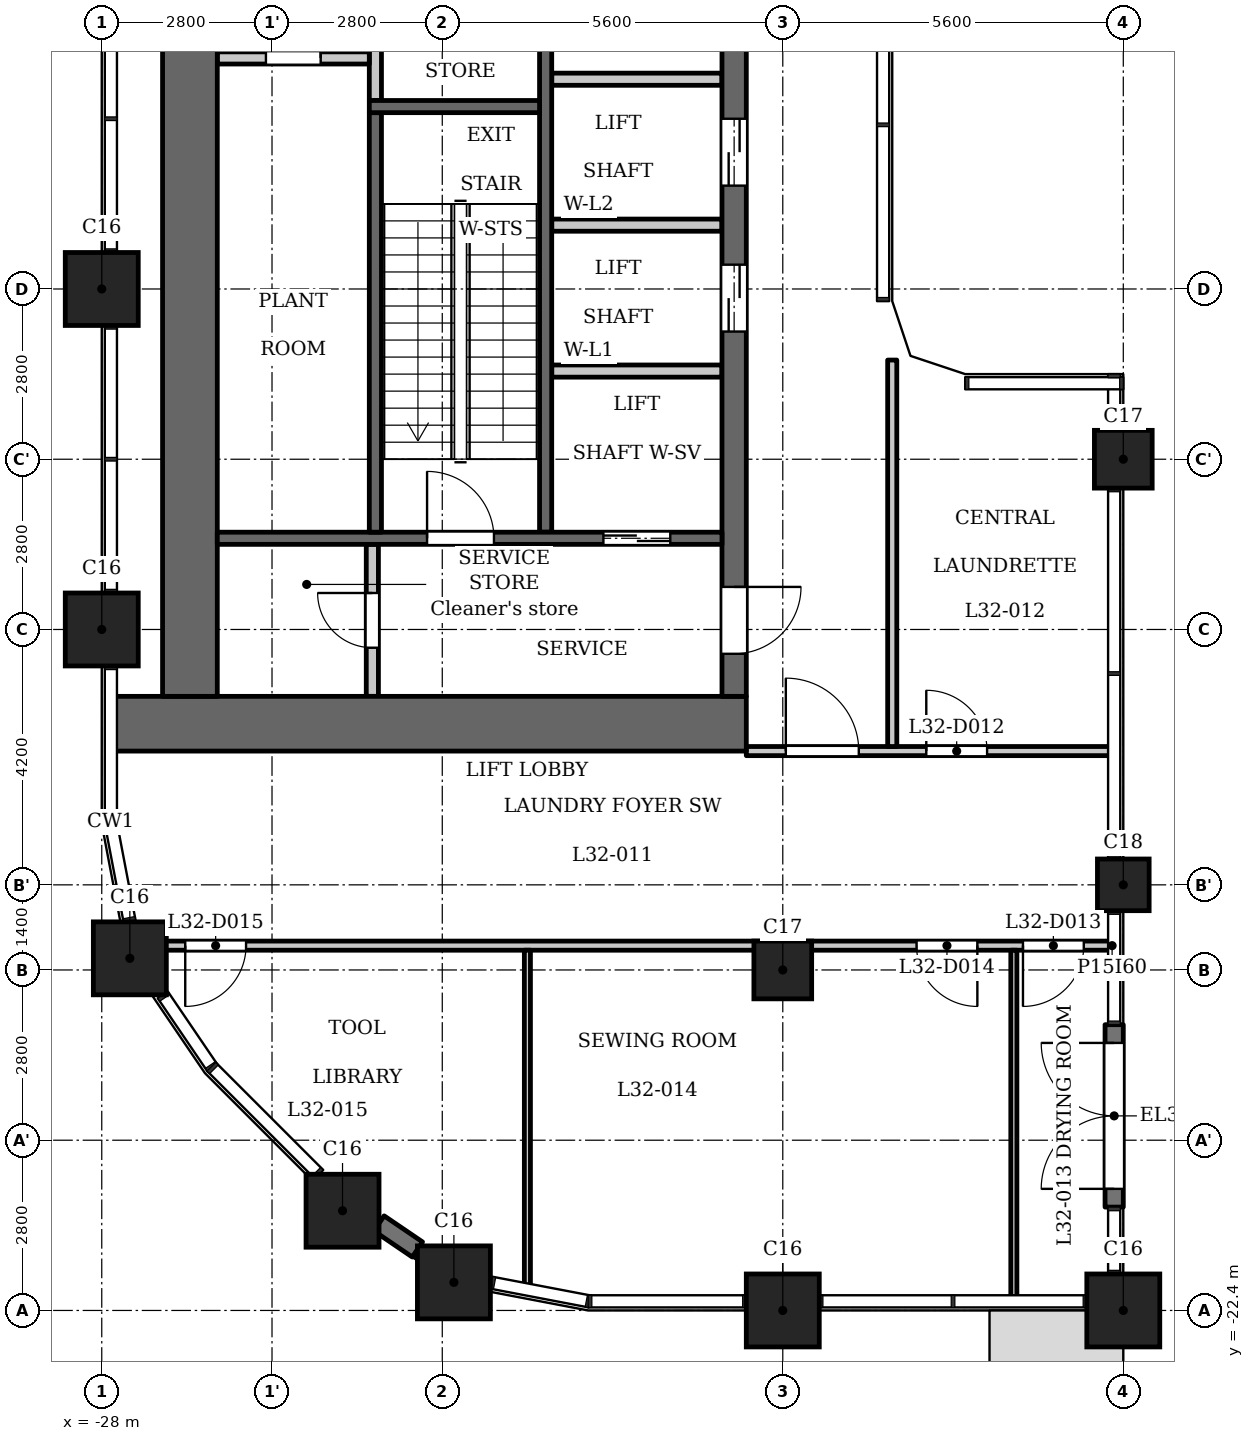
"""IFC4 building model, lengths in metres.
Left out: names, types, materials, properties, quantities, classifications, styles, units other than length and angle.
Written with IfcOpenShell. Run it as: python <this file> out.ifc"""

import sys

from ifc_helpers import new_model, si_unit, direction, frame, frame_2d, origin, origin_2d, place, context, subcontext, project, spatial, polyline, rectangle, outline, extrude, element, fill, save


model = new_model("IFC4")
c1 = context("Model", 3, precision=1e-05, world=origin(), true_north=direction((0.0, 1.0)))
c2 = subcontext(c1, "Body", "Model", "MODEL_VIEW")
j1 = project(units=[si_unit("LENGTHUNIT", "METRE"), si_unit("PLANEANGLEUNIT", "RADIAN")], contexts=[c1])
p1 = place(None, origin())
s1 = spatial("IfcSite", under=j1, at=p1, CompositionType="ELEMENT")
p2 = place(p1, origin())
s2 = spatial("IfcBuilding", under=s1, at=p2, CompositionType="ELEMENT")
p3 = place(p2, frame((0.0, 0.0, 125.3)))
s3 = spatial("IfcBuildingStorey", under=s2, at=p3, CompositionType="ELEMENT", Elevation=125.3)
for number, where, z_axis, x_axis in (
    (1, (-22.209, -21.938, 0.0), (0.0, 0.0, 1.0), (1.0, 0.0, 0.0)),
    (2, (-16.8, -22.4, 0.0), (0.0, 0.0, 1.0), (1.0, 0.0, 0.0)),
    (3, (-11.2, -22.4, 0.0), (0.0, 0.0, 1.0), (1.0, 0.0, 0.0)),
    (4, (-28.0, -5.6, 0.0), (0.0, 0.0, 1.0), (1.0, 0.0, 0.0)),
    (5, (-28.0, -11.2, 0.0), (0.0, 0.0, 1.0), (1.0, 0.0, 0.0)),
    (6, (-27.538, -16.609, 0.0), (0.0, 0.0, 1.0), (1.0, 0.0, 0.0)),
    (7, (-24.04, -20.76, 0.0), (0.0, 0.0, 1.0), (1.0, 0.0, 0.0)),
):
    element("IfcColumn", number, at=place(p3, frame(where, z_axis=z_axis, x_axis=x_axis)), inside=s3, PredefinedType="COLUMN", context=c2, shape_type="SweptSolid", body=[
        extrude(rectangle(XDim=1.2, YDim=1.2, at=origin_2d()), origin(), (0.0, 0.0, 1.0), 5.4),
    ])
for number, where, z_axis, x_axis in (
    (8, (-16.8, -16.8, 0.0), (0.0, 0.0, 1.0), (1.0, 0.0, 0.0)),
    (9, (-11.2, -8.4, 0.0), (0.0, 0.0, 1.0), (1.0, 0.0, 0.0)),
):
    element("IfcColumn", number, at=place(p3, frame(where, z_axis=z_axis, x_axis=x_axis)), inside=s3, PredefinedType="COLUMN", context=c2, shape_type="SweptSolid", body=[
        extrude(rectangle(XDim=0.95, YDim=0.95, at=origin_2d()), origin(), (0.0, 0.0, 1.0), 5.4),
    ])
p4 = place(p3, frame((-11.2, -15.4, 0.0), z_axis=(0.0, 0.0, 1.0), x_axis=(1.0, 0.0, 0.0)))
e10 = element("IfcColumn", 10, at=p4, inside=s3, PredefinedType="COLUMN", context=c2, shape_type="SweptSolid", body=[
    extrude(rectangle(XDim=0.85, YDim=0.85, at=origin_2d()), origin(), (0.0, 0.0, 1.0), 5.4),
])
p5 = place(p3, frame((-11.35, -20.7, 0.0), z_axis=(0.0, 0.0, 1.0), x_axis=(0.0, 1.0, 0.0)))
e11 = element("IfcWall", 11, at=p5, inside=s3, PredefinedType="SOLIDWALL", context=c2, shape_type="SweptSolid", body=[
    extrude(rectangle(XDim=3.0, YDim=0.3, at=frame_2d((1.5, 0.0))), origin(), (0.0, 0.0, 1.0), 4.95),
])
p6 = place(p5, frame((0.3, 0.0, 0.0)))
e12 = element("IfcOpeningElement", 12, at=p6, cuts=e11, PredefinedType="OPENING", context=c2, shape_type="SweptSolid", body=[
    extrude(rectangle(XDim=2.4, YDim=2.3, at=frame_2d((1.2, 1.15))), frame((0.0, 0.16, 0.0), z_axis=(0.0, -1.0, 0.0), x_axis=(1.0, 0.0, 0.0)), (0.0, 0.0, 1.0), 0.32),
])
p7 = place(p3, frame((-23.44, -20.968, 0.0), z_axis=(0.0, 0.0, 1.0), x_axis=(0.827098912605, -0.562056392872, 0.0)))
e13 = element("IfcWall", 13, at=p7, inside=s3, PredefinedType="SOLIDWALL", context=c2, shape_type="SweptSolid", body=[
    extrude(rectangle(XDim=0.764, YDim=0.3, at=frame_2d((0.382, 0.0))), origin(), (0.0, 0.0, 1.0), 4.95),
])
p8 = place(p3, frame((-23.5, -2.5, 0.0), z_axis=(0.0, 0.0, 1.0), x_axis=(0.0, 1.0, 0.0)))
e14 = element("IfcWall", 14, at=p8, inside=s3, PredefinedType="PARTITIONING", context=c2, shape_type="SweptSolid", body=[
    extrude(rectangle(XDim=2.65, YDim=0.2, at=frame_2d((1.325, 0.0))), origin(), (0.0, 0.0, 1.0), 4.95),
])
p9 = place(p3, frame((-20.7, -9.6, 0.0), z_axis=(0.0, 0.0, 1.0), x_axis=(0.0, 1.0, 0.0)))
e15 = element("IfcWall", 15, at=p9, inside=s3, PredefinedType="SHEAR", context=c2, shape_type="SweptSolid", body=[
    extrude(rectangle(XDim=9.75, YDim=0.2, at=frame_2d((4.875, 0.0))), origin(), (0.0, 0.0, 1.0), 4.95),
])
p10 = place(p3, frame((-17.4, -12.75, 0.0), z_axis=(0.0, 0.0, 1.0), x_axis=(-1.0, 0.0, 0.0)))
e16 = element("IfcWall", 16, at=p10, inside=s3, PredefinedType="SHEAR", context=c2, shape_type="SweptSolid", body=[
    extrude(rectangle(XDim=10.4, YDim=0.9, at=frame_2d((5.2, 0.0))), origin(), (0.0, 0.0, 1.0), 4.95),
])
p11 = place(p3, frame((-17.6, -12.3, 0.0), z_axis=(0.0, 0.0, 1.0), x_axis=(0.0, 1.0, 0.0)))
e17 = element("IfcWall", 17, at=p11, inside=s3, PredefinedType="SHEAR", context=c2, shape_type="SweptSolid", body=[
    extrude(rectangle(XDim=24.6, YDim=0.4, at=frame_2d((12.3, 0.0))), origin(), (0.0, 0.0, 1.0), 4.95),
])
p12 = place(p11, frame((6.0, 0.0, 0.0)))
e18 = element("IfcOpeningElement", 18, at=p12, cuts=e17, PredefinedType="OPENING", context=c2, shape_type="SweptSolid", body=[
    extrude(rectangle(XDim=1.1, YDim=2.1, at=frame_2d((0.55, 1.05))), frame((0.0, 0.21, 0.0), z_axis=(0.0, -1.0, 0.0), x_axis=(1.0, 0.0, 0.0)), (0.0, 0.0, 1.0), 0.42),
])
p13 = place(p11, frame((8.4, 0.0, 0.0)))
e19 = element("IfcOpeningElement", 19, at=p13, cuts=e17, PredefinedType="OPENING", context=c2, shape_type="SweptSolid", body=[
    extrude(rectangle(XDim=1.1, YDim=2.1, at=frame_2d((0.55, 1.05))), frame((0.0, 0.21, 0.0), z_axis=(0.0, -1.0, 0.0), x_axis=(1.0, 0.0, 0.0)), (0.0, 0.0, 1.0), 0.42),
])
p14 = place(p11, frame((10.8, 0.0, 0.0)))
e20 = element("IfcOpeningElement", 20, at=p14, cuts=e17, PredefinedType="OPENING", context=c2, shape_type="SweptSolid", body=[
    extrude(rectangle(XDim=1.1, YDim=2.1, at=frame_2d((0.55, 1.05))), frame((0.0, 0.21, 0.0), z_axis=(0.0, -1.0, 0.0), x_axis=(1.0, 0.0, 0.0)), (0.0, 0.0, 1.0), 0.42),
])
p15 = place(p11, frame((15.45, 0.0, 0.0)))
e21 = element("IfcOpeningElement", 21, at=p15, cuts=e17, PredefinedType="OPENING", context=c2, shape_type="SweptSolid", body=[
    extrude(rectangle(XDim=1.1, YDim=2.1, at=frame_2d((0.55, 1.05))), frame((0.0, 0.21, 0.0), z_axis=(0.0, -1.0, 0.0), x_axis=(1.0, 0.0, 0.0)), (0.0, 0.0, 1.0), 0.42),
])
p16 = place(p11, frame((17.85, 0.0, 0.0)))
e22 = element("IfcOpeningElement", 22, at=p16, cuts=e17, PredefinedType="OPENING", context=c2, shape_type="SweptSolid", body=[
    extrude(rectangle(XDim=1.1, YDim=2.1, at=frame_2d((0.55, 1.05))), frame((0.0, 0.21, 0.0), z_axis=(0.0, -1.0, 0.0), x_axis=(1.0, 0.0, 0.0)), (0.0, 0.0, 1.0), 0.42),
])
p17 = place(p11, frame((22.8, 0.0, 0.0)))
e23 = element("IfcOpeningElement", 23, at=p17, cuts=e17, PredefinedType="OPENING", context=c2, shape_type="SweptSolid", body=[
    extrude(rectangle(XDim=1.1, YDim=2.1, at=frame_2d((0.55, 1.05))), frame((0.0, 0.21, 0.0), z_axis=(0.0, -1.0, 0.0), x_axis=(1.0, 0.0, 0.0)), (0.0, 0.0, 1.0), 0.42),
])
p18 = place(p11, frame((0.7, 0.0, 0.0)))
e24 = element("IfcOpeningElement", 24, at=p18, cuts=e17, PredefinedType="OPENING", context=c2, shape_type="SweptSolid", body=[
    extrude(rectangle(XDim=1.1, YDim=2.1, at=frame_2d((0.55, 1.05))), frame((0.0, 0.21, 0.0), z_axis=(0.0, -1.0, 0.0), x_axis=(1.0, 0.0, 0.0)), (0.0, 0.0, 1.0), 0.42),
])
p19 = place(p11, frame((12.775, 0.0, 0.0)))
e25 = element("IfcOpeningElement", 25, at=p19, cuts=e17, PredefinedType="OPENING", context=c2, shape_type="SweptSolid", body=[
    extrude(rectangle(XDim=1.8, YDim=2.1, at=frame_2d((0.9, 1.05))), frame((0.0, 0.21, 0.0), z_axis=(0.0, -1.0, 0.0), x_axis=(1.0, 0.0, 0.0)), (0.0, 0.0, 1.0), 0.42),
])
p20 = place(p3, frame((-26.55, -12.3, 0.0), z_axis=(0.0, 0.0, 1.0), x_axis=(0.0, 1.0, 0.0)))
e26 = element("IfcWall", 26, at=p20, inside=s3, PredefinedType="SHEAR", context=c2, shape_type="SweptSolid", body=[
    extrude(rectangle(XDim=24.6, YDim=0.9, at=frame_2d((12.3, 0.0))), origin(), (0.0, 0.0, 1.0), 4.95),
])
p21 = place(p3, frame((-23.55, -12.3, 0.0), z_axis=(0.0, 0.0, 1.0), x_axis=(0.0, 1.0, 0.0)))
e27 = element("IfcWall", 27, at=p21, inside=s3, PredefinedType="PARTITIONING", context=c2, shape_type="SweptSolid", body=[
    extrude(rectangle(XDim=2.5, YDim=0.2, at=frame_2d((1.25, 0.0))), origin(), (0.0, 0.0, 1.0), 4.95),
])
p22 = place(p21, frame((0.8, 0.0, 0.0)))
e28 = element("IfcOpeningElement", 28, at=p22, cuts=e27, PredefinedType="OPENING", context=c2, shape_type="SweptSolid", body=[
    extrude(rectangle(XDim=0.9, YDim=2.1, at=frame_2d((0.45, 1.05))), frame((0.0, 0.11, 0.0), z_axis=(0.0, -1.0, 0.0), x_axis=(1.0, 0.0, 0.0)), (0.0, 0.0, 1.0), 0.22),
])
p23 = place(p3, frame((-23.6, -1.8, 0.0), z_axis=(0.0, 0.0, 1.0), x_axis=(-1.0, 0.0, 0.0)))
e29 = element("IfcWall", 29, at=p23, inside=s3, PredefinedType="PARTITIONING", context=c2, shape_type="SweptSolid", body=[
    extrude(rectangle(XDim=2.5, YDim=0.2, at=frame_2d((1.25, 0.0))), origin(), (0.0, 0.0, 1.0), 4.95),
])
p24 = place(p23, frame((0.8, 0.0, 0.0)))
e30 = element("IfcOpeningElement", 30, at=p24, cuts=e29, PredefinedType="OPENING", context=c2, shape_type="SweptSolid", body=[
    extrude(rectangle(XDim=0.9, YDim=2.1, at=frame_2d((0.45, 1.05))), frame((0.0, 0.11, 0.0), z_axis=(0.0, -1.0, 0.0), x_axis=(1.0, 0.0, 0.0)), (0.0, 0.0, 1.0), 0.22),
])
p25 = place(p3, frame((-17.8, -9.7, 0.0), z_axis=(0.0, 0.0, 1.0), x_axis=(-1.0, 0.0, 0.0)))
e31 = element("IfcWall", 31, at=p25, inside=s3, PredefinedType="SHEAR", context=c2, shape_type="SweptSolid", body=[
    extrude(rectangle(XDim=8.3, YDim=0.2, at=frame_2d((4.15, 0.0))), origin(), (0.0, 0.0, 1.0), 4.95),
])
p26 = place(p25, frame((0.85, 0.0, 0.0)))
e32 = element("IfcOpeningElement", 32, at=p26, cuts=e31, PredefinedType="OPENING", context=c2, shape_type="SweptSolid", body=[
    extrude(rectangle(XDim=1.1, YDim=2.1, at=frame_2d((0.55, 1.05))), frame((0.0, 0.11, 0.0), z_axis=(0.0, -1.0, 0.0), x_axis=(1.0, 0.0, 0.0)), (0.0, 0.0, 1.0), 0.22),
])
p27 = place(p25, frame((3.75, 0.0, 0.0)))
e33 = element("IfcOpeningElement", 33, at=p27, cuts=e31, PredefinedType="OPENING", context=c2, shape_type="SweptSolid", body=[
    extrude(rectangle(XDim=1.1, YDim=2.1, at=frame_2d((0.55, 1.05))), frame((0.0, 0.11, 0.0), z_axis=(0.0, -1.0, 0.0), x_axis=(1.0, 0.0, 0.0)), (0.0, 0.0, 1.0), 0.22),
])
for number, where, z_axis, x_axis in (
    (34, (-17.8, -6.95, 0.0), (0.0, 0.0, 1.0), (-1.0, 0.0, 0.0)),
    (35, (-17.8, -4.55, 0.0), (0.0, 0.0, 1.0), (-1.0, 0.0, 0.0)),
    (36, (-17.8, -2.15, 0.0), (0.0, 0.0, 1.0), (-1.0, 0.0, 0.0)),
):
    element("IfcWall", number, at=place(p3, frame(where, z_axis=z_axis, x_axis=x_axis)), inside=s3, PredefinedType="PARTITIONING", context=c2, shape_type="SweptSolid", body=[
        extrude(rectangle(XDim=2.8, YDim=0.2, at=frame_2d((1.4, 0.0))), origin(), (0.0, 0.0, 1.0), 4.95),
    ])
p28 = place(p3, frame((-23.5, -9.6, 0.0), z_axis=(0.0, 0.0, 1.0), x_axis=(0.0, 1.0, 0.0)))
e37 = element("IfcWall", 37, at=p28, inside=s3, PredefinedType="SHEAR", context=c2, shape_type="SweptSolid", body=[
    extrude(rectangle(XDim=6.9, YDim=0.2, at=frame_2d((3.45, 0.0))), origin(), (0.0, 0.0, 1.0), 4.95),
])
p29 = place(p3, frame((-20.8, -2.6, 0.0), z_axis=(0.0, 0.0, 1.0), x_axis=(-1.0, 0.0, 0.0)))
e38 = element("IfcWall", 38, at=p29, inside=s3, PredefinedType="SHEAR", context=c2, shape_type="SweptSolid", body=[
    extrude(rectangle(XDim=2.8, YDim=0.2, at=frame_2d((1.4, 0.0))), origin(), (0.0, 0.0, 1.0), 4.95),
])
p30 = place(p3, frame((-27.52, -16.4, 0.0), z_axis=(0.0, 0.0, 1.0), x_axis=(1.0, 0.0, 0.0)))
e39 = element("IfcWall", 39, at=p30, inside=s3, PredefinedType="PARTITIONING", context=c2, shape_type="SweptSolid", body=[
    extrude(rectangle(XDim=16.136, YDim=0.15, at=frame_2d((8.068, 0.0))), origin(), (0.0, 0.0, 1.0), 4.95),
])
p31 = place(p30, frame((14.67, 0.0, 0.0)))
e40 = element("IfcOpeningElement", 40, at=p31, cuts=e39, PredefinedType="OPENING", context=c2, shape_type="SweptSolid", body=[
    extrude(rectangle(XDim=1.0, YDim=2.1, at=frame_2d((0.5, 1.05))), frame((0.0, 0.085, 0.0), z_axis=(0.0, -1.0, 0.0), x_axis=(1.0, 0.0, 0.0)), (0.0, 0.0, 1.0), 0.17),
])
p32 = place(p30, frame((12.92, 0.0, 0.0)))
e41 = element("IfcOpeningElement", 41, at=p32, cuts=e39, PredefinedType="OPENING", context=c2, shape_type="SweptSolid", body=[
    extrude(rectangle(XDim=1.0, YDim=2.1, at=frame_2d((0.5, 1.05))), frame((0.0, 0.085, 0.0), z_axis=(0.0, -1.0, 0.0), x_axis=(1.0, 0.0, 0.0)), (0.0, 0.0, 1.0), 0.17),
])
p33 = place(p30, frame((0.893, 0.0, 0.0)))
e42 = element("IfcOpeningElement", 42, at=p33, cuts=e39, PredefinedType="OPENING", context=c2, shape_type="SweptSolid", body=[
    extrude(rectangle(XDim=1.0, YDim=2.1, at=frame_2d((0.5, 1.05))), frame((0.0, 0.085, 0.0), z_axis=(0.0, -1.0, 0.0), x_axis=(1.0, 0.0, 0.0)), (0.0, 0.0, 1.0), 0.17),
])
p34 = place(p3, frame((-17.4, -13.2, 0.0), z_axis=(0.0, 0.0, 1.0), x_axis=(1.0, 0.0, 0.0)))
e43 = element("IfcWall", 43, at=p34, inside=s3, PredefinedType="PARTITIONING", context=c2, shape_type="SweptSolid", body=[
    extrude(rectangle(XDim=6.016, YDim=0.15, at=frame_2d((3.008, 0.0))), origin(), (0.0, 0.0, 1.0), 4.95),
])
p35 = place(p34, frame((0.65, 0.0, 0.0)))
e44 = element("IfcOpeningElement", 44, at=p35, cuts=e43, PredefinedType="OPENING", context=c2, shape_type="SweptSolid", body=[
    extrude(rectangle(XDim=1.2, YDim=2.1, at=frame_2d((0.6, 1.05))), frame((0.0, 0.085, 0.0), z_axis=(0.0, -1.0, 0.0), x_axis=(1.0, 0.0, 0.0)), (0.0, 0.0, 1.0), 0.17),
])
p36 = place(p34, frame((2.96, 0.0, 0.0)))
e45 = element("IfcOpeningElement", 45, at=p36, cuts=e43, PredefinedType="OPENING", context=c2, shape_type="SweptSolid", body=[
    extrude(rectangle(XDim=1.0, YDim=2.1, at=frame_2d((0.5, 1.05))), frame((0.0, 0.085, 0.0), z_axis=(0.0, -1.0, 0.0), x_axis=(1.0, 0.0, 0.0)), (0.0, 0.0, 1.0), 0.17),
])
p37 = place(p3, frame((-21.0, -22.022, 0.0), z_axis=(0.0, 0.0, 1.0), x_axis=(0.0, 1.0, 0.0)))
e46 = element("IfcWall", 46, at=p37, inside=s3, PredefinedType="PARTITIONING", context=c2, shape_type="SweptSolid", body=[
    extrude(rectangle(XDim=5.547, YDim=0.1, at=frame_2d((2.773, 0.0))), origin(), (0.0, 0.0, 1.0), 4.95),
])
p38 = place(p3, frame((-15.0, -13.125, 0.0), z_axis=(0.0, 0.0, 1.0), x_axis=(0.0, 1.0, 0.0)))
e47 = element("IfcWall", 47, at=p38, inside=s3, PredefinedType="PARTITIONING", context=c2, shape_type="SweptSolid", body=[
    extrude(rectangle(XDim=6.356, YDim=0.15, at=frame_2d((3.178, 0.0))), origin(), (0.0, 0.0, 1.0), 4.95),
])
p39 = place(p3, frame((-13.0, -22.216, 0.0), z_axis=(0.0, 0.0, 1.0), x_axis=(0.0, 1.0, 0.0)))
e48 = element("IfcWall", 48, at=p39, inside=s3, PredefinedType="PARTITIONING", context=c2, shape_type="SweptSolid", body=[
    extrude(rectangle(XDim=5.741, YDim=0.1, at=frame_2d((2.871, 0.0))), origin(), (0.0, 0.0, 1.0), 4.95),
])
p40 = place(p3, origin())
e49 = element("IfcWall", 49, at=p40, inside=s3, PredefinedType="SOLIDWALL", context=c2, shape_type="SweptSolid", body=[
    extrude(outline(polyline([(-13.8, -7.0), (-14.7, -6.7), (-15.0, -5.8), (-15.3, -5.8), (-15.3, -5.849), (-14.937, -6.937), (-13.849, -7.3), (-13.8, -7.3), (-13.8, -7.0)])), origin(), (0.0, 0.0, 1.0), 4.95),
])
p41 = place(p6, origin())
e50 = element("IfcDoor", 50, at=p41, inside=s3, OperationType="SINGLE_SWING_LEFT", PredefinedType="DOOR", context=c2, shape_type="SweptSolid", body=[
    extrude(rectangle(XDim=2.4, YDim=2.3, at=frame_2d((1.2, 1.15))), frame((0.0, 0.025, 0.0), z_axis=(0.0, -1.0, 0.0), x_axis=(1.0, 0.0, 0.0)), (0.0, 0.0, 1.0), 0.05),
])
fill(e12, e50)
p42 = place(p26, origin())
e51 = element("IfcDoor", 51, at=p42, inside=s3, OperationType="DOUBLE_DOOR_SLIDING", PredefinedType="DOOR", context=c2, shape_type="SweptSolid", body=[
    extrude(rectangle(XDim=1.1, YDim=2.1, at=frame_2d((0.55, 1.05))), frame((0.0, 0.025, 0.0), z_axis=(0.0, -1.0, 0.0), x_axis=(1.0, 0.0, 0.0)), (0.0, 0.0, 1.0), 0.05),
])
fill(e32, e51)
p43 = place(p12, origin())
e52 = element("IfcDoor", 52, at=p43, inside=s3, OperationType="DOUBLE_DOOR_SLIDING", PredefinedType="DOOR", context=c2, shape_type="SweptSolid", body=[
    extrude(rectangle(XDim=1.1, YDim=2.1, at=frame_2d((0.55, 1.05))), frame((0.0, 0.025, 0.0), z_axis=(0.0, -1.0, 0.0), x_axis=(1.0, 0.0, 0.0)), (0.0, 0.0, 1.0), 0.05),
])
fill(e18, e52)
p44 = place(p13, origin())
e53 = element("IfcDoor", 53, at=p44, inside=s3, OperationType="DOUBLE_DOOR_SLIDING", PredefinedType="DOOR", context=c2, shape_type="SweptSolid", body=[
    extrude(rectangle(XDim=1.1, YDim=2.1, at=frame_2d((0.55, 1.05))), frame((0.0, 0.025, 0.0), z_axis=(0.0, -1.0, 0.0), x_axis=(1.0, 0.0, 0.0)), (0.0, 0.0, 1.0), 0.05),
])
fill(e19, e53)
p45 = place(p18, origin())
e54 = element("IfcDoor", 54, at=p45, inside=s3, OperationType="SINGLE_SWING_RIGHT", PredefinedType="DOOR", context=c2, shape_type="SweptSolid", body=[
    extrude(rectangle(XDim=1.1, YDim=2.1, at=frame_2d((0.55, 1.05))), frame((0.0, 0.025, 0.0), z_axis=(0.0, -1.0, 0.0), x_axis=(1.0, 0.0, 0.0)), (0.0, 0.0, 1.0), 0.05),
])
fill(e24, e54)
p46 = place(p22, origin())
e55 = element("IfcDoor", 55, at=p46, inside=s3, OperationType="SINGLE_SWING_LEFT", PredefinedType="DOOR", context=c2, shape_type="SweptSolid", body=[
    extrude(rectangle(XDim=0.9, YDim=2.1, at=frame_2d((0.45, 1.05))), frame((0.0, 0.025, 0.0), z_axis=(0.0, -1.0, 0.0), x_axis=(1.0, 0.0, 0.0)), (0.0, 0.0, 1.0), 0.05),
])
fill(e28, e55)
p47 = place(p27, origin())
e56 = element("IfcDoor", 56, at=p47, inside=s3, OperationType="SINGLE_SWING_RIGHT", PredefinedType="DOOR", context=c2, shape_type="SweptSolid", body=[
    extrude(rectangle(XDim=1.1, YDim=2.1, at=frame_2d((0.55, 1.05))), frame((0.0, 0.025, 0.0), z_axis=(0.0, -1.0, 0.0), x_axis=(1.0, 0.0, 0.0)), (0.0, 0.0, 1.0), 0.05),
])
fill(e33, e56)
p48 = place(p24, origin())
e57 = element("IfcDoor", 57, at=p48, inside=s3, OperationType="SINGLE_SWING_LEFT", PredefinedType="DOOR", context=c2, shape_type="SweptSolid", body=[
    extrude(rectangle(XDim=0.9, YDim=2.1, at=frame_2d((0.45, 1.05))), frame((0.0, 0.025, 0.0), z_axis=(0.0, -1.0, 0.0), x_axis=(1.0, 0.0, 0.0)), (0.0, 0.0, 1.0), 0.05),
])
fill(e30, e57)
p49 = place(p35, origin())
e58 = element("IfcDoor", 58, at=p49, inside=s3, OperationType="SINGLE_SWING_RIGHT", PredefinedType="DOOR", context=c2, shape_type="SweptSolid", body=[
    extrude(rectangle(XDim=1.2, YDim=2.1, at=frame_2d((0.6, 1.05))), frame((0.0, 0.025, 0.0), z_axis=(0.0, -1.0, 0.0), x_axis=(1.0, 0.0, 0.0)), (0.0, 0.0, 1.0), 0.05),
])
fill(e44, e58)
p50 = place(p36, origin())
e59 = element("IfcDoor", 59, at=p50, inside=s3, OperationType="SINGLE_SWING_RIGHT", PredefinedType="DOOR", context=c2, shape_type="SweptSolid", body=[
    extrude(rectangle(XDim=1.0, YDim=2.1, at=frame_2d((0.5, 1.05))), frame((0.0, 0.025, 0.0), z_axis=(0.0, -1.0, 0.0), x_axis=(1.0, 0.0, 0.0)), (0.0, 0.0, 1.0), 0.05),
])
fill(e45, e59)
p51 = place(p31, origin())
e60 = element("IfcDoor", 60, at=p51, inside=s3, OperationType="SINGLE_SWING_LEFT", PredefinedType="DOOR", context=c2, shape_type="SweptSolid", body=[
    extrude(rectangle(XDim=1.0, YDim=2.1, at=frame_2d((0.5, 1.05))), frame((0.0, 0.025, 0.0), z_axis=(0.0, -1.0, 0.0), x_axis=(1.0, 0.0, 0.0)), (0.0, 0.0, 1.0), 0.05),
])
fill(e40, e60)
p52 = place(p32, origin())
e61 = element("IfcDoor", 61, at=p52, inside=s3, OperationType="SINGLE_SWING_RIGHT", PredefinedType="DOOR", context=c2, shape_type="SweptSolid", body=[
    extrude(rectangle(XDim=1.0, YDim=2.1, at=frame_2d((0.5, 1.05))), frame((0.0, 0.025, 0.0), z_axis=(0.0, -1.0, 0.0), x_axis=(1.0, 0.0, 0.0)), (0.0, 0.0, 1.0), 0.05),
])
fill(e41, e61)
p53 = place(p33, origin())
e62 = element("IfcDoor", 62, at=p53, inside=s3, OperationType="SINGLE_SWING_LEFT", PredefinedType="DOOR", context=c2, shape_type="SweptSolid", body=[
    extrude(rectangle(XDim=1.0, YDim=2.1, at=frame_2d((0.5, 1.05))), frame((0.0, 0.025, 0.0), z_axis=(0.0, -1.0, 0.0), x_axis=(1.0, 0.0, 0.0)), (0.0, 0.0, 1.0), 0.05),
])
fill(e42, e62)
save(model, sys.argv[1])
